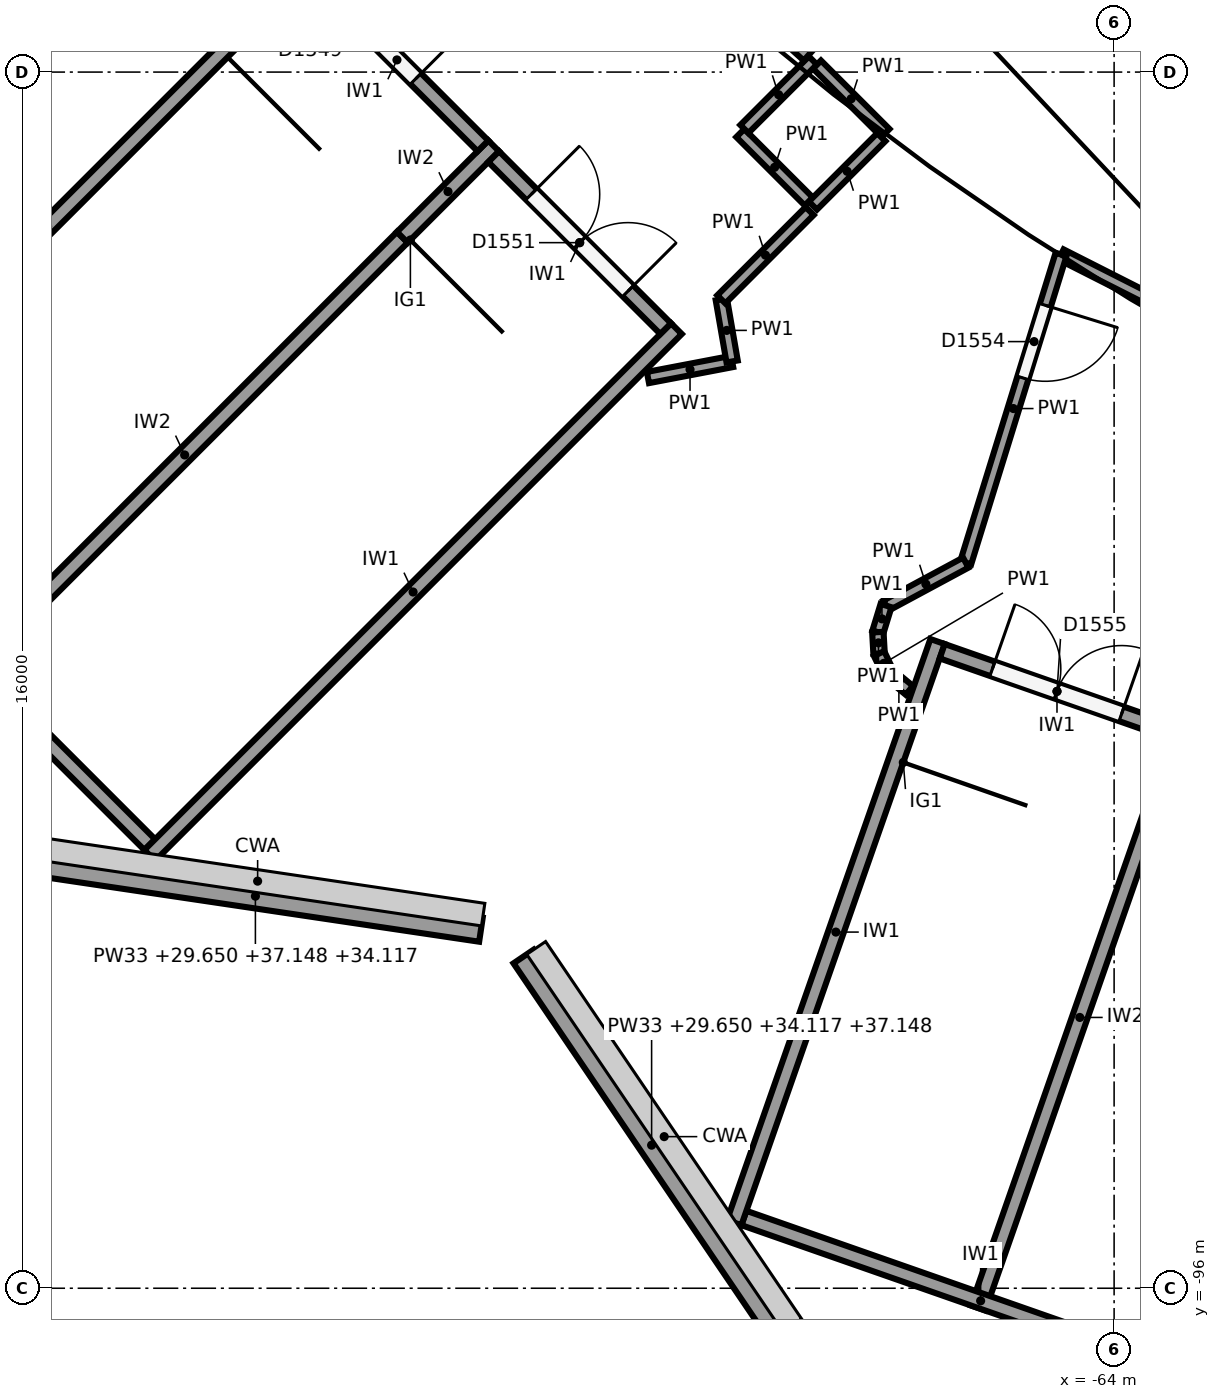
"""IFC4 building model, lengths in metres.
Left out: names, types, materials, properties, quantities, classifications, styles, units other than length and angle.
Written with IfcOpenShell. Run it as: python <this file> out.ifc"""

import sys

from ifc_helpers import new_model, si_unit, direction, frame, frame_2d, origin, origin_2d, place, context, subcontext, project, spatial, polyline, rectangle, circle, outline, extrude, element, fill, save


model = new_model("IFC4")
c1 = context("Model", 3, precision=1e-05, world=origin(), true_north=direction((0.0, 1.0)))
c2 = subcontext(c1, "Body", "Model", "MODEL_VIEW")
j1 = project(units=[si_unit("LENGTHUNIT", "METRE"), si_unit("PLANEANGLEUNIT", "RADIAN")], contexts=[c1])
p1 = place(None, origin())
s1 = spatial("IfcSite", under=j1, at=p1, CompositionType="ELEMENT")
p2 = place(p1, origin())
s2 = spatial("IfcBuilding", under=s1, at=p2, CompositionType="ELEMENT")
p3 = place(p2, frame((0.0, 0.0, 24.0)))
s3 = spatial("IfcBuildingStorey", under=s2, at=p3, CompositionType="ELEMENT", Elevation=24.0)
p4 = place(p3, frame((-71.775, -79.889, 0.0), z_axis=(0.0, 0.0, 1.0), x_axis=(1.0, 0.0, 0.0)))
e1 = element("IfcColumn", 1, at=p4, inside=s3, PredefinedType="COLUMN", context=c2, shape_type="SweptSolid", body=[
    extrude(circle(Radius=0.6, at=origin_2d()), origin(), (0.0, 0.0, 1.0), 6.0),
])
p5 = place(p3, frame((-64.622, -84.792, 0.0), z_axis=(0.0, 0.0, 1.0), x_axis=(1.0, 0.0, 0.0)))
e2 = element("IfcColumn", 2, at=p5, inside=s3, PredefinedType="COLUMN", context=c2, shape_type="SweptSolid", body=[
    extrude(circle(Radius=0.5, at=origin_2d()), origin(), (0.0, 0.0, 1.0), 5.3),
])
p6 = place(p3, frame((-71.857, -91.151, 0.0), z_axis=(0.0, 0.0, 1.0), x_axis=(1.0, 0.0, 0.0)))
e3 = element("IfcColumn", 3, at=p6, inside=s3, PredefinedType="COLUMN", context=c2, shape_type="SweptSolid", body=[
    extrude(circle(Radius=0.45, at=origin_2d()), origin(), (0.0, 0.0, 1.0), 6.0),
])
p7 = place(p3, frame((-72.331, -91.283, 5.65), z_axis=(0.0, 0.0, 1.0), x_axis=(-0.989158190862, 0.146853918747, 0.0)))
e4 = element("IfcWall", 4, at=p7, inside=s3, PredefinedType="SOLIDWALL", context=c2, shape_type="SweptSolid", body=[
    extrude(outline(polyline([(0.0, 0.0), (6.0, 0.0), (6.0, 7.498), (0.0, 4.467), (0.0, 0.0)])), frame((0.0, 0.16, 0.0), z_axis=(0.0, -1.0, 0.0), x_axis=(1.0, 0.0, 0.0)), (0.0, 0.0, 1.0), 0.32),
])
p8 = place(p3, frame((-68.401, -96.6, 5.65), z_axis=(0.0, 0.0, 1.0), x_axis=(-0.561498433341, 0.827477799917, 0.0)))
e5 = element("IfcWall", 5, at=p8, inside=s3, PredefinedType="SOLIDWALL", context=c2, shape_type="SweptSolid", body=[
    extrude(outline(polyline([(0.0, 0.0), (6.0, 0.0), (6.0, 4.467), (0.0, 7.498), (0.0, 0.0)])), frame((0.0, 0.16, 0.0), z_axis=(0.0, -1.0, 0.0), x_axis=(1.0, 0.0, 0.0)), (0.0, 0.0, 1.0), 0.32),
])
for number, where, z_axis, x_axis in (
    (6, (-81.497, -85.497, 0.0), (0.0, 0.0, 1.0), (0.707, 0.707, 0.0)),
    (7, (-76.688, -90.305, 0.0), (0.0, 0.0, 1.0), (0.707, 0.707, 0.0)),
):
    element("IfcWall", number, at=place(p3, frame(where, z_axis=z_axis, x_axis=x_axis)), inside=s3, PredefinedType="SHEAR", context=c2, shape_type="SweptSolid", body=[
        extrude(rectangle(XDim=9.8, YDim=0.2, at=frame_2d((4.9, 0.0))), origin(), (0.0, 0.0, 1.0), 5.75),
    ])
p9 = place(p3, frame((-81.355, -85.497, 0.0), z_axis=(0.0, 0.0, 1.0), x_axis=(0.707088285305, -0.707125276584, 0.0)))
e8 = element("IfcWall", 8, at=p9, inside=s3, PredefinedType="SHEAR", context=c2, shape_type="SweptSolid", body=[
    extrude(rectangle(XDim=6.6, YDim=0.2, at=frame_2d((3.3, 0.0))), origin(), (0.0, 0.0, 1.0), 5.75),
])
p10 = place(p3, frame((-79.093, -87.901, 0.0), z_axis=(0.0, 0.0, 1.0), x_axis=(0.707106781187, 0.707106781187, 0.0)))
e9 = element("IfcWall", 9, at=p10, inside=s3, PredefinedType="SHEAR", context=c2, shape_type="SweptSolid", body=[
    extrude(rectangle(XDim=8.1, YDim=0.2, at=frame_2d((4.05, 0.0))), origin(), (0.0, 0.0, 1.0), 5.75),
])
p11 = place(p3, frame((-73.365, -82.173, 0.0), z_axis=(0.0, 0.0, 1.0), x_axis=(0.707034968179, 0.707178586901, 0.0)))
e10 = element("IfcWall", 10, at=p11, inside=s3, PredefinedType="SHEAR", context=c2, shape_type="SweptSolid", body=[
    extrude(rectangle(XDim=1.7, YDim=0.2, at=frame_2d((0.85, 0.0))), origin(), (0.0, 0.0, 1.0), 5.75),
])
p12 = place(p3, frame((-74.567, -78.708, 0.0), z_axis=(0.0, 0.0, 1.0), x_axis=(0.707106781187, -0.707106781187, 0.0)))
e11 = element("IfcWall", 11, at=p12, inside=s3, PredefinedType="SHEAR", context=c2, shape_type="SweptSolid", body=[
    extrude(rectangle(XDim=3.2, YDim=0.2, at=frame_2d((1.6, 0.0))), origin(), (0.0, 0.0, 1.0), 5.75),
])
p13 = place(p12, frame((0.15, 0.0, 0.0)))
e12 = element("IfcOpeningElement", 12, at=p13, cuts=e11, PredefinedType="OPENING", context=c2, shape_type="SweptSolid", body=[
    extrude(rectangle(XDim=1.8, YDim=2.1, at=frame_2d((0.9, 1.05))), frame((0.0, 0.11, 0.0), z_axis=(0.0, -1.0, 0.0), x_axis=(1.0, 0.0, 0.0)), (0.0, 0.0, 1.0), 0.22),
])
p14 = place(p3, frame((-72.163, -81.113, 0.0), z_axis=(0.0, 0.0, 1.0), x_axis=(0.707144925854, -0.707068634461, 0.0)))
e13 = element("IfcWall", 13, at=p14, inside=s3, PredefinedType="SHEAR", context=c2, shape_type="SweptSolid", body=[
    extrude(rectangle(XDim=3.2, YDim=0.2, at=frame_2d((1.6, 0.0))), origin(), (0.0, 0.0, 1.0), 5.75),
])
p15 = place(p14, frame((0.7, 0.0, 0.0)))
e14 = element("IfcOpeningElement", 14, at=p15, cuts=e13, PredefinedType="OPENING", context=c2, shape_type="SweptSolid", body=[
    extrude(rectangle(XDim=1.8, YDim=2.1, at=frame_2d((0.9, 1.05))), frame((0.0, 0.11, 0.0), z_axis=(0.0, -1.0, 0.0), x_axis=(1.0, 0.0, 0.0)), (0.0, 0.0, 1.0), 0.22),
])
p16 = place(p3, frame((-68.998, -95.137, 0.0), z_axis=(0.0, 0.0, 1.0), x_axis=(0.330263153216, 0.943888896866, 0.0)))
e15 = element("IfcWall", 15, at=p16, inside=s3, PredefinedType="SHEAR", context=c2, shape_type="SweptSolid", body=[
    extrude(rectangle(XDim=8.1, YDim=0.2, at=frame_2d((4.05, 0.0))), origin(), (0.0, 0.0, 1.0), 5.75),
])
p17 = place(p3, frame((-68.871, -95.076, 0.0), z_axis=(0.0, 0.0, 1.0), x_axis=(0.943880844925, -0.330286164688, 0.0)))
e16 = element("IfcWall", 16, at=p17, inside=s3, PredefinedType="SHEAR", context=c2, shape_type="SweptSolid", body=[
    extrude(rectangle(XDim=6.6, YDim=0.2, at=frame_2d((3.3, 0.0))), origin(), (0.0, 0.0, 1.0), 5.75),
])
p18 = place(p3, frame((-65.789, -96.26, 0.0), z_axis=(0.0, 0.0, 1.0), x_axis=(0.330280610426, 0.943882788474, 0.0)))
e17 = element("IfcWall", 17, at=p18, inside=s3, PredefinedType="SHEAR", context=c2, shape_type="SweptSolid", body=[
    extrude(rectangle(XDim=8.1, YDim=0.2, at=frame_2d((4.05, 0.0))), origin(), (0.0, 0.0, 1.0), 5.75),
])
p19 = place(p3, frame((-66.262, -87.619, 0.0), z_axis=(0.0, 0.0, 1.0), x_axis=(0.943878576031, -0.330292648585, 0.0)))
e18 = element("IfcWall", 18, at=p19, inside=s3, PredefinedType="SHEAR", context=c2, shape_type="SweptSolid", body=[
    extrude(rectangle(XDim=3.2, YDim=0.2, at=frame_2d((1.6, 0.0))), origin(), (0.0, 0.0, 1.0), 5.75),
])
p20 = place(p19, frame((0.7, 0.0, 0.0)))
e19 = element("IfcOpeningElement", 19, at=p20, cuts=e18, PredefinedType="OPENING", context=c2, shape_type="SweptSolid", body=[
    extrude(rectangle(XDim=1.8, YDim=2.1, at=frame_2d((0.9, 1.05))), frame((0.0, 0.11, 0.0), z_axis=(0.0, -1.0, 0.0), x_axis=(1.0, 0.0, 0.0)), (0.0, 0.0, 1.0), 0.22),
])
for number, where, z_axis, x_axis in (
    (20, (-68.918, -80.802, 0.0), (0.0, 0.0, 1.0), (0.707, -0.707, 0.0)),
    (21, (-67.963, -81.757, 0.0), (0.0, 0.0, 1.0), (0.707, 0.707, 0.0)),
    (22, (-67.009, -80.802, 0.0), (0.0, 0.0, 1.0), (-0.707, 0.707, 0.0)),
):
    element("IfcWall", number, at=place(p3, frame(where, z_axis=z_axis, x_axis=x_axis)), inside=s3, PredefinedType="PARTITIONING", context=c2, shape_type="SweptSolid", body=[
        extrude(rectangle(XDim=1.275, YDim=0.15, at=frame_2d((0.638, 0.0))), origin(), (0.0, 0.0, 1.0), 5.4),
    ])
p21 = place(p3, frame((-67.963, -79.847, 0.0), z_axis=(0.0, 0.0, 1.0), x_axis=(-0.707202523759, -0.707011025648, 0.0)))
e23 = element("IfcWall", 23, at=p21, inside=s3, PredefinedType="PARTITIONING", context=c2, shape_type="SweptSolid", body=[
    extrude(rectangle(XDim=1.275, YDim=0.15, at=frame_2d((0.637, 0.0))), origin(), (0.0, 0.0, 1.0), 5.4),
])
p22 = place(p3, frame((-70.134, -84.018, 0.0), z_axis=(0.0, 0.0, 1.0), x_axis=(0.982266484486, 0.187490142289, 0.0)))
e24 = element("IfcWall", 24, at=p22, inside=s3, PredefinedType="PARTITIONING", context=c2, shape_type="SweptSolid", body=[
    extrude(rectangle(XDim=1.128, YDim=0.15, at=frame_2d((0.564, 0.0))), origin(), (0.0, 0.0, 1.0), 5.4),
])
p23 = place(p3, frame((-69.026, -83.807, 0.0), z_axis=(0.0, 0.0, 1.0), x_axis=(-0.171316329805, 0.985216075357, 0.0)))
e25 = element("IfcWall", 25, at=p23, inside=s3, PredefinedType="PARTITIONING", context=c2, shape_type="SweptSolid", body=[
    extrude(rectangle(XDim=0.829, YDim=0.15, at=frame_2d((0.415, 0.0))), origin(), (0.0, 0.0, 1.0), 5.4),
])
p24 = place(p3, frame((-69.168, -82.99, 0.0), z_axis=(0.0, 0.0, 1.0), x_axis=(0.707106781187, 0.707106781187, 0.0)))
e26 = element("IfcWall", 26, at=p24, inside=s3, PredefinedType="PARTITIONING", context=c2, shape_type="SweptSolid", body=[
    extrude(rectangle(XDim=1.643, YDim=0.15, at=frame_2d((0.822, 0.0))), origin(), (0.0, 0.0, 1.0), 5.4),
])
p25 = place(p3, frame((-68.034, -79.792, 0.0), z_axis=(0.0, 0.0, 1.0), x_axis=(-0.742586219179, 0.669750481213, 0.0)))
e27 = element("IfcWall", 27, at=p25, inside=s3, PredefinedType="PARTITIONING", context=c2, shape_type="SweptSolid", body=[
    extrude(rectangle(XDim=2.454, YDim=0.15, at=frame_2d((1.227, 0.0))), origin(), (0.0, 0.0, 1.0), 5.4),
])
p26 = place(p3, frame((-59.413, -85.078, 0.0), z_axis=(0.0, 0.0, 1.0), x_axis=(-0.891999670452, 0.45203604714, 0.0)))
e28 = element("IfcWall", 28, at=p26, inside=s3, PredefinedType="PARTITIONING", context=c2, shape_type="SweptSolid", body=[
    extrude(rectangle(XDim=5.925, YDim=0.15, at=frame_2d((2.963, 0.0))), origin(), (0.0, 0.0, 1.0), 5.4),
])
p27 = place(p3, frame((-64.698, -82.399, 0.0), z_axis=(0.0, 0.0, 1.0), x_axis=(-0.295354963717, -0.955387589101, 0.0)))
e29 = element("IfcWall", 29, at=p27, inside=s3, PredefinedType="PARTITIONING", context=c2, shape_type="SweptSolid", body=[
    extrude(rectangle(XDim=4.244, YDim=0.15, at=frame_2d((2.122, 0.0))), origin(), (0.0, 0.0, 1.0), 5.4),
])
p28 = place(p27, frame((0.7, 0.0, 0.0)))
e30 = element("IfcOpeningElement", 30, at=p28, cuts=e29, PredefinedType="OPENING", context=c2, shape_type="SweptSolid", body=[
    extrude(rectangle(XDim=1.0, YDim=2.1, at=frame_2d((0.5, 1.05))), frame((0.0, 0.085, 0.0), z_axis=(0.0, -1.0, 0.0), x_axis=(1.0, 0.0, 0.0)), (0.0, 0.0, 1.0), 0.17),
])
p29 = place(p3, frame((-65.952, -86.454, 0.0), z_axis=(0.0, 0.0, 1.0), x_axis=(-0.880497411133, -0.47405095611, 0.0)))
e31 = element("IfcWall", 31, at=p29, inside=s3, PredefinedType="PARTITIONING", context=c2, shape_type="SweptSolid", body=[
    extrude(rectangle(XDim=1.192, YDim=0.15, at=frame_2d((0.596, 0.0))), origin(), (0.0, 0.0, 1.0), 5.4),
])
p30 = place(p3, frame((-67.001, -87.019, 0.0), z_axis=(0.0, 0.0, 1.0), x_axis=(-0.293100450663, -0.956081652277, 0.0)))
e32 = element("IfcWall", 32, at=p30, inside=s3, PredefinedType="PARTITIONING", context=c2, shape_type="SweptSolid", body=[
    extrude(rectangle(XDim=0.366, YDim=0.15, at=frame_2d((0.183, 0.0))), origin(), (0.0, 0.0, 1.0), 5.4),
])
p31 = place(p3, frame((-67.108, -87.368, 0.0), z_axis=(0.0, 0.0, 1.0), x_axis=(0.056236685659, -0.998417465385, 0.0)))
e33 = element("IfcWall", 33, at=p31, inside=s3, PredefinedType="PARTITIONING", context=c2, shape_type="SweptSolid", body=[
    extrude(rectangle(XDim=0.282, YDim=0.15, at=frame_2d((0.141, 0.0))), origin(), (0.0, 0.0, 1.0), 5.4),
])
p32 = place(p3, frame((-67.093, -87.65, 0.0), z_axis=(0.0, 0.0, 1.0), x_axis=(0.43378984255, -0.901014080079, 0.0)))
e34 = element("IfcWall", 34, at=p32, inside=s3, PredefinedType="PARTITIONING", context=c2, shape_type="SweptSolid", body=[
    extrude(rectangle(XDim=0.285, YDim=0.15, at=frame_2d((0.142, 0.0))), origin(), (0.0, 0.0, 1.0), 5.4),
])
p33 = place(p3, frame((-66.969, -87.907, 0.0), z_axis=(0.0, 0.0, 1.0), x_axis=(0.770463975756, -0.63748353866, 0.0)))
e35 = element("IfcWall", 35, at=p33, inside=s3, PredefinedType="PARTITIONING", context=c2, shape_type="SweptSolid", body=[
    extrude(rectangle(XDim=0.356, YDim=0.15, at=frame_2d((0.178, 0.0))), origin(), (0.0, 0.0, 1.0), 5.4),
])
p34 = place(p13, origin())
e36 = element("IfcDoor", 36, at=p34, inside=s3, OperationType="DOUBLE_DOOR_SINGLE_SWING", PredefinedType="DOOR", context=c2, shape_type="SweptSolid", body=[
    extrude(rectangle(XDim=1.8, YDim=2.1, at=frame_2d((0.9, 1.05))), frame((0.0, 0.025, 0.0), z_axis=(0.0, -1.0, 0.0), x_axis=(1.0, 0.0, 0.0)), (0.0, 0.0, 1.0), 0.05),
])
fill(e12, e36)
p35 = place(p15, origin())
e37 = element("IfcDoor", 37, at=p35, inside=s3, OperationType="DOUBLE_DOOR_SINGLE_SWING", PredefinedType="DOOR", context=c2, shape_type="SweptSolid", body=[
    extrude(rectangle(XDim=1.8, YDim=2.1, at=frame_2d((0.9, 1.05))), frame((0.0, 0.025, 0.0), z_axis=(0.0, -1.0, 0.0), x_axis=(1.0, 0.0, 0.0)), (0.0, 0.0, 1.0), 0.05),
])
fill(e14, e37)
p36 = place(p20, origin())
e38 = element("IfcDoor", 38, at=p36, inside=s3, OperationType="DOUBLE_DOOR_SINGLE_SWING", PredefinedType="DOOR", context=c2, shape_type="SweptSolid", body=[
    extrude(rectangle(XDim=1.8, YDim=2.1, at=frame_2d((0.9, 1.05))), frame((0.0, 0.025, 0.0), z_axis=(0.0, -1.0, 0.0), x_axis=(1.0, 0.0, 0.0)), (0.0, 0.0, 1.0), 0.05),
])
fill(e19, e38)
p37 = place(p28, origin())
e39 = element("IfcDoor", 39, at=p37, inside=s3, OperationType="SINGLE_SWING_LEFT", PredefinedType="DOOR", context=c2, shape_type="SweptSolid", body=[
    extrude(rectangle(XDim=1.0, YDim=2.1, at=frame_2d((0.5, 1.05))), frame((0.0, 0.025, 0.0), z_axis=(0.0, -1.0, 0.0), x_axis=(1.0, 0.0, 0.0)), (0.0, 0.0, 1.0), 0.05),
])
fill(e30, e39)
save(model, sys.argv[1])
